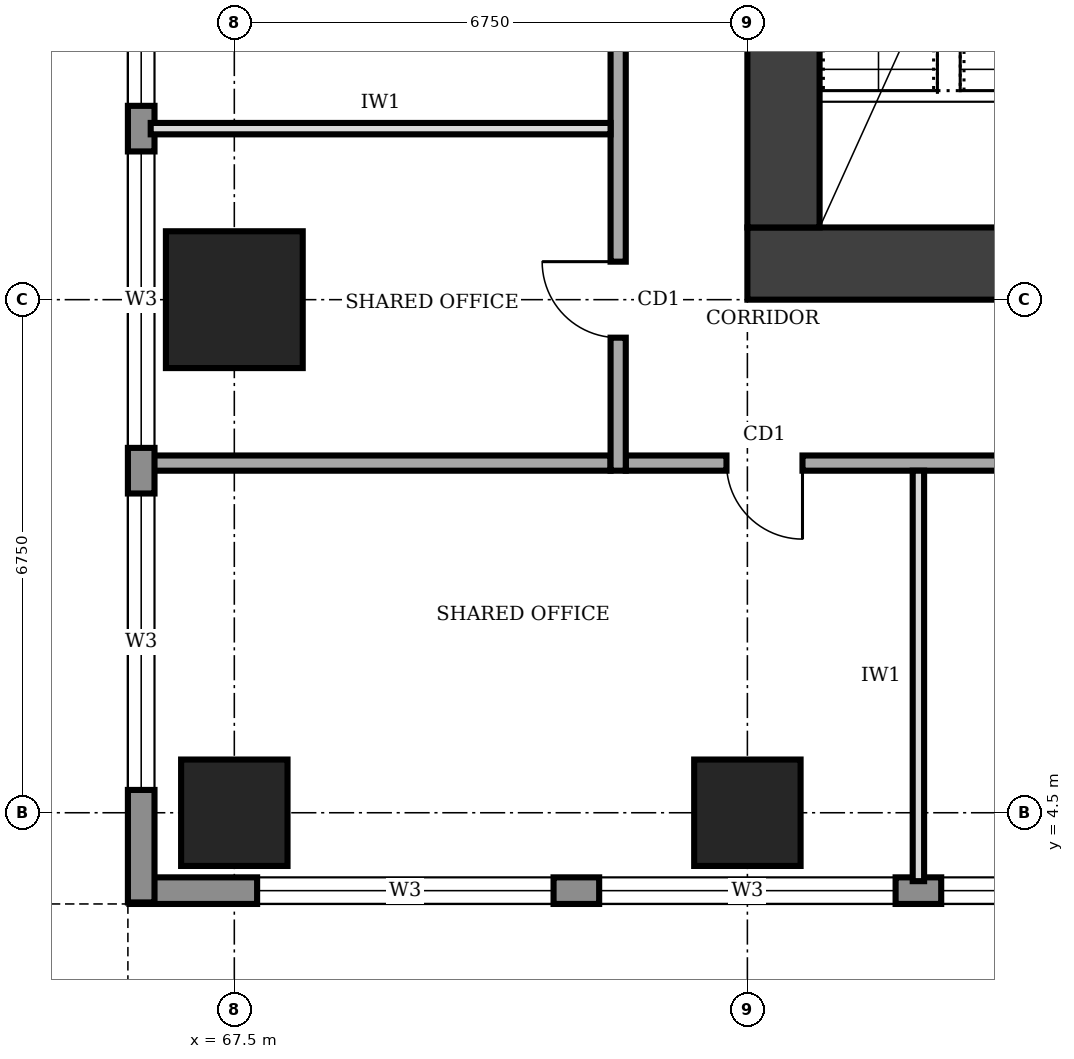
"""IFC4 building model, lengths in metres.
Left out: names, types, materials, properties, quantities, classifications, styles, units other than length and angle.
Written with IfcOpenShell. Run it as: python <this file> out.ifc"""

import sys

from ifc_helpers import new_model, si_unit, direction, frame, frame_2d, origin, origin_2d, place, context, subcontext, project, spatial, rectangle, extrude, element, fill, save


model = new_model("IFC4")
c1 = context("Model", 3, precision=1e-05, world=origin(), true_north=direction((0.0, 1.0)))
c2 = subcontext(c1, "Body", "Model", "MODEL_VIEW")
j1 = project(units=[si_unit("LENGTHUNIT", "METRE"), si_unit("PLANEANGLEUNIT", "RADIAN")], contexts=[c1])
p1 = place(None, origin())
s1 = spatial("IfcSite", under=j1, at=p1, CompositionType="ELEMENT")
p2 = place(p1, origin())
s2 = spatial("IfcBuilding", under=s1, at=p2, CompositionType="ELEMENT")
p3 = place(p2, frame((0.0, 0.0, 181.0)))
s3 = spatial("IfcBuildingStorey", under=s2, at=p3, CompositionType="ELEMENT", Elevation=181.0)
p4 = place(p3, frame((74.25, 11.725, 0.0), z_axis=(0.0, 0.0, 1.0), x_axis=(1.0, 0.0, 0.0)))
e1 = element("IfcWall", 1, at=p4, inside=s3, PredefinedType="SHEAR", context=c2, shape_type="SweptSolid", body=[
    extrude(rectangle(XDim=13.5, YDim=0.95, at=frame_2d((6.75, 0.0))), origin(), (0.0, 0.0, 1.0), 4.0),
])
p5 = place(p4, frame((4.75, 0.0, 0.0)))
e2 = element("IfcOpeningElement", 2, at=p5, cuts=e1, PredefinedType="OPENING", context=c2, shape_type="SweptSolid", body=[
    extrude(rectangle(XDim=1.0, YDim=2.1, at=frame_2d((0.5, 1.05))), frame((0.0, 0.485, 0.0), z_axis=(0.0, -1.0, 0.0), x_axis=(1.0, 0.0, 0.0)), (0.0, 0.0, 1.0), 0.97),
])
p6 = place(p3, frame((74.725, 28.3, 0.0), z_axis=(0.0, 0.0, 1.0), x_axis=(0.0, -1.0, 0.0)))
e3 = element("IfcWall", 3, at=p6, inside=s3, PredefinedType="SHEAR", context=c2, shape_type="SweptSolid", body=[
    extrude(rectangle(XDim=16.1, YDim=0.95, at=frame_2d((8.05, 0.0))), origin(), (0.0, 0.0, 1.0), 4.0),
])
for number, where, z_axis, x_axis in (
    (4, (67.5, 4.5, 0.0), (0.0, 0.0, 1.0), (1.0, 0.0, 0.0)),
    (5, (74.25, 4.5, 0.0), (0.0, 0.0, 1.0), (1.0, 0.0, 0.0)),
):
    element("IfcColumn", number, at=place(p3, frame(where, z_axis=z_axis, x_axis=x_axis)), inside=s3, PredefinedType="COLUMN", context=c2, shape_type="SweptSolid", body=[
        extrude(rectangle(XDim=1.4, YDim=1.4, at=origin_2d()), origin(), (0.0, 0.0, 1.0), 4.0),
    ])
p7 = place(p3, frame((67.5, 11.25, 0.0), z_axis=(0.0, 0.0, 1.0), x_axis=(1.0, 0.0, 0.0)))
e6 = element("IfcColumn", 6, at=p7, inside=s3, PredefinedType="COLUMN", context=c2, shape_type="SweptSolid", body=[
    extrude(rectangle(XDim=1.8, YDim=1.8, at=origin_2d()), origin(), (0.0, 0.0, 1.0), 4.0),
])
p8 = place(p3, frame((66.12, 3.475, 0.0), z_axis=(0.0, 0.0, 1.0), x_axis=(1.0, 0.0, 0.0)))
e7 = element("IfcWall", 7, at=p8, inside=s3, PredefinedType="STANDARD", context=c2, shape_type="SweptSolid", body=[
    extrude(rectangle(XDim=29.91, YDim=0.35, at=frame_2d((14.955, 0.0))), origin(), (0.0, 0.0, 1.0), 3.75),
])
p9 = place(p8, frame((1.68, 0.0, 0.95)))
e8 = element("IfcOpeningElement", 8, at=p9, cuts=e7, PredefinedType="OPENING", context=c2, shape_type="SweptSolid", body=[
    extrude(rectangle(XDim=3.9, YDim=1.8, at=frame_2d((1.95, 0.9))), frame((0.0, 0.185, 0.0), z_axis=(0.0, -1.0, 0.0), x_axis=(1.0, 0.0, 0.0)), (0.0, 0.0, 1.0), 0.37),
])
p10 = place(p8, frame((6.18, 0.0, 0.95)))
e9 = element("IfcOpeningElement", 9, at=p10, cuts=e7, PredefinedType="OPENING", context=c2, shape_type="SweptSolid", body=[
    extrude(rectangle(XDim=3.9, YDim=1.8, at=frame_2d((1.95, 0.9))), frame((0.0, 0.185, 0.0), z_axis=(0.0, -1.0, 0.0), x_axis=(1.0, 0.0, 0.0)), (0.0, 0.0, 1.0), 0.37),
])
p11 = place(p8, frame((10.68, 0.0, 0.95)))
e10 = element("IfcOpeningElement", 10, at=p11, cuts=e7, PredefinedType="OPENING", context=c2, shape_type="SweptSolid", body=[
    extrude(rectangle(XDim=3.9, YDim=1.8, at=frame_2d((1.95, 0.9))), frame((0.0, 0.185, 0.0), z_axis=(0.0, -1.0, 0.0), x_axis=(1.0, 0.0, 0.0)), (0.0, 0.0, 1.0), 0.37),
])
p12 = place(p8, frame((15.18, 0.0, 0.95)))
e11 = element("IfcOpeningElement", 11, at=p12, cuts=e7, PredefinedType="OPENING", context=c2, shape_type="SweptSolid", body=[
    extrude(rectangle(XDim=3.9, YDim=1.8, at=frame_2d((1.95, 0.9))), frame((0.0, 0.185, 0.0), z_axis=(0.0, -1.0, 0.0), x_axis=(1.0, 0.0, 0.0)), (0.0, 0.0, 1.0), 0.37),
])
p13 = place(p8, frame((19.68, 0.0, 0.95)))
e12 = element("IfcOpeningElement", 12, at=p13, cuts=e7, PredefinedType="OPENING", context=c2, shape_type="SweptSolid", body=[
    extrude(rectangle(XDim=3.9, YDim=1.8, at=frame_2d((1.95, 0.9))), frame((0.0, 0.185, 0.0), z_axis=(0.0, -1.0, 0.0), x_axis=(1.0, 0.0, 0.0)), (0.0, 0.0, 1.0), 0.37),
])
p14 = place(p8, frame((24.18, 0.0, 0.95)))
e13 = element("IfcOpeningElement", 13, at=p14, cuts=e7, PredefinedType="OPENING", context=c2, shape_type="SweptSolid", body=[
    extrude(rectangle(XDim=3.9, YDim=1.8, at=frame_2d((1.95, 0.9))), frame((0.0, 0.185, 0.0), z_axis=(0.0, -1.0, 0.0), x_axis=(1.0, 0.0, 0.0)), (0.0, 0.0, 1.0), 0.37),
])
p15 = place(p3, frame((66.275, 37.18, 0.0), z_axis=(0.0, 0.0, 1.0), x_axis=(0.0, -1.0, 0.0)))
e14 = element("IfcWall", 14, at=p15, inside=s3, PredefinedType="STANDARD", context=c2, shape_type="SweptSolid", body=[
    extrude(rectangle(XDim=33.86, YDim=0.35, at=frame_2d((16.93, 0.0))), origin(), (0.0, 0.0, 1.0), 3.75),
])
p16 = place(p15, frame((28.48, 0.0, 0.95)))
e15 = element("IfcOpeningElement", 15, at=p16, cuts=e14, PredefinedType="OPENING", context=c2, shape_type="SweptSolid", body=[
    extrude(rectangle(XDim=3.9, YDim=1.8, at=frame_2d((1.95, 0.9))), frame((0.0, 0.185, 0.0), z_axis=(0.0, -1.0, 0.0), x_axis=(1.0, 0.0, 0.0)), (0.0, 0.0, 1.0), 0.37),
])
p17 = place(p15, frame((23.98, 0.0, 0.95)))
e16 = element("IfcOpeningElement", 16, at=p17, cuts=e14, PredefinedType="OPENING", context=c2, shape_type="SweptSolid", body=[
    extrude(rectangle(XDim=3.9, YDim=1.8, at=frame_2d((1.95, 0.9))), frame((0.0, 0.185, 0.0), z_axis=(0.0, -1.0, 0.0), x_axis=(1.0, 0.0, 0.0)), (0.0, 0.0, 1.0), 0.37),
])
p18 = place(p15, frame((19.48, 0.0, 0.95)))
e17 = element("IfcOpeningElement", 17, at=p18, cuts=e14, PredefinedType="OPENING", context=c2, shape_type="SweptSolid", body=[
    extrude(rectangle(XDim=3.9, YDim=1.8, at=frame_2d((1.95, 0.9))), frame((0.0, 0.185, 0.0), z_axis=(0.0, -1.0, 0.0), x_axis=(1.0, 0.0, 0.0)), (0.0, 0.0, 1.0), 0.37),
])
p19 = place(p15, frame((14.98, 0.0, 0.95)))
e18 = element("IfcOpeningElement", 18, at=p19, cuts=e14, PredefinedType="OPENING", context=c2, shape_type="SweptSolid", body=[
    extrude(rectangle(XDim=3.9, YDim=1.8, at=frame_2d((1.95, 0.9))), frame((0.0, 0.185, 0.0), z_axis=(0.0, -1.0, 0.0), x_axis=(1.0, 0.0, 0.0)), (0.0, 0.0, 1.0), 0.37),
])
p20 = place(p15, frame((10.48, 0.0, 0.95)))
e19 = element("IfcOpeningElement", 19, at=p20, cuts=e14, PredefinedType="OPENING", context=c2, shape_type="SweptSolid", body=[
    extrude(rectangle(XDim=3.9, YDim=1.8, at=frame_2d((1.95, 0.9))), frame((0.0, 0.185, 0.0), z_axis=(0.0, -1.0, 0.0), x_axis=(1.0, 0.0, 0.0)), (0.0, 0.0, 1.0), 0.37),
])
p21 = place(p15, frame((5.98, 0.0, 0.95)))
e20 = element("IfcOpeningElement", 20, at=p21, cuts=e14, PredefinedType="OPENING", context=c2, shape_type="SweptSolid", body=[
    extrude(rectangle(XDim=3.9, YDim=1.8, at=frame_2d((1.95, 0.9))), frame((0.0, 0.185, 0.0), z_axis=(0.0, -1.0, 0.0), x_axis=(1.0, 0.0, 0.0)), (0.0, 0.0, 1.0), 0.37),
])
p22 = place(p15, frame((1.48, 0.0, 0.95)))
e21 = element("IfcOpeningElement", 21, at=p22, cuts=e14, PredefinedType="OPENING", context=c2, shape_type="SweptSolid", body=[
    extrude(rectangle(XDim=3.9, YDim=1.8, at=frame_2d((1.95, 0.9))), frame((0.0, 0.185, 0.0), z_axis=(0.0, -1.0, 0.0), x_axis=(1.0, 0.0, 0.0)), (0.0, 0.0, 1.0), 0.37),
])
p23 = place(p3, frame((72.65, 9.1, 0.0), z_axis=(0.0, 0.0, 1.0), x_axis=(1.0, 0.0, 0.0)))
e22 = element("IfcWall", 22, at=p23, inside=s3, PredefinedType="SOLIDWALL", context=c2, shape_type="SweptSolid", body=[
    extrude(rectangle(XDim=16.9, YDim=0.2, at=frame_2d((8.45, 0.0))), origin(), (0.0, 0.0, 1.0), 3.75),
])
p24 = place(p23, frame((1.325, 0.0, 0.0)))
e23 = element("IfcOpeningElement", 23, at=p24, cuts=e22, PredefinedType="OPENING", context=c2, shape_type="SweptSolid", body=[
    extrude(rectangle(XDim=1.0, YDim=2.1, at=frame_2d((0.5, 1.05))), frame((0.0, 0.11, 0.0), z_axis=(0.0, -1.0, 0.0), x_axis=(1.0, 0.0, 0.0)), (0.0, 0.0, 1.0), 0.22),
])
p25 = place(p23, frame((9.475, 0.0, 0.0)))
e24 = element("IfcOpeningElement", 24, at=p25, cuts=e22, PredefinedType="OPENING", context=c2, shape_type="SweptSolid", body=[
    extrude(rectangle(XDim=1.8, YDim=2.1, at=frame_2d((0.9, 1.05))), frame((0.0, 0.11, 0.0), z_axis=(0.0, -1.0, 0.0), x_axis=(1.0, 0.0, 0.0)), (0.0, 0.0, 1.0), 0.22),
])
p26 = place(p3, frame((72.55, 32.05, 0.0), z_axis=(0.0, 0.0, 1.0), x_axis=(0.0, -1.0, 0.0)))
e25 = element("IfcWall", 25, at=p26, inside=s3, PredefinedType="SOLIDWALL", context=c2, shape_type="SweptSolid", body=[
    extrude(rectangle(XDim=23.05, YDim=0.2, at=frame_2d((11.525, 0.0))), origin(), (0.0, 0.0, 1.0), 3.75),
])
p27 = place(p26, frame((20.3, 0.0, 0.0)))
e26 = element("IfcOpeningElement", 26, at=p27, cuts=e25, PredefinedType="OPENING", context=c2, shape_type="SweptSolid", body=[
    extrude(rectangle(XDim=1.0, YDim=2.1, at=frame_2d((0.5, 1.05))), frame((0.0, 0.11, 0.0), z_axis=(0.0, -1.0, 0.0), x_axis=(1.0, 0.0, 0.0)), (0.0, 0.0, 1.0), 0.22),
])
p28 = place(p26, frame((15.875, 0.0, 0.0)))
e27 = element("IfcOpeningElement", 27, at=p28, cuts=e25, PredefinedType="OPENING", context=c2, shape_type="SweptSolid", body=[
    extrude(rectangle(XDim=1.0, YDim=2.1, at=frame_2d((0.5, 1.05))), frame((0.0, 0.11, 0.0), z_axis=(0.0, -1.0, 0.0), x_axis=(1.0, 0.0, 0.0)), (0.0, 0.0, 1.0), 0.22),
])
p29 = place(p26, frame((11.3, 0.0, 0.0)))
e28 = element("IfcOpeningElement", 28, at=p29, cuts=e25, PredefinedType="OPENING", context=c2, shape_type="SweptSolid", body=[
    extrude(rectangle(XDim=1.0, YDim=2.1, at=frame_2d((0.5, 1.05))), frame((0.0, 0.11, 0.0), z_axis=(0.0, -1.0, 0.0), x_axis=(1.0, 0.0, 0.0)), (0.0, 0.0, 1.0), 0.22),
])
p30 = place(p26, frame((6.725, 0.0, 0.0)))
e29 = element("IfcOpeningElement", 29, at=p30, cuts=e25, PredefinedType="OPENING", context=c2, shape_type="SweptSolid", body=[
    extrude(rectangle(XDim=1.0, YDim=2.1, at=frame_2d((0.5, 1.05))), frame((0.0, 0.11, 0.0), z_axis=(0.0, -1.0, 0.0), x_axis=(1.0, 0.0, 0.0)), (0.0, 0.0, 1.0), 0.22),
])
p31 = place(p26, frame((1.925, 0.0, 0.0)))
e30 = element("IfcOpeningElement", 30, at=p31, cuts=e25, PredefinedType="OPENING", context=c2, shape_type="SweptSolid", body=[
    extrude(rectangle(XDim=1.0, YDim=2.1, at=frame_2d((0.5, 1.05))), frame((0.0, 0.11, 0.0), z_axis=(0.0, -1.0, 0.0), x_axis=(1.0, 0.0, 0.0)), (0.0, 0.0, 1.0), 0.22),
])
p32 = place(p3, frame((66.4, 9.1, 0.0), z_axis=(0.0, 0.0, 1.0), x_axis=(1.0, 0.0, 0.0)))
e31 = element("IfcWall", 31, at=p32, inside=s3, PredefinedType="SOLIDWALL", context=c2, shape_type="SweptSolid", body=[
    extrude(rectangle(XDim=6.05, YDim=0.2, at=frame_2d((3.025, 0.0))), origin(), (0.0, 0.0, 1.0), 3.75),
])
p33 = place(p3, frame((76.5, 3.6, 0.0), z_axis=(0.0, 0.0, 1.0), x_axis=(0.0, 1.0, 0.0)))
e32 = element("IfcWall", 32, at=p33, inside=s3, PredefinedType="PARTITIONING", context=c2, shape_type="SweptSolid", body=[
    extrude(rectangle(XDim=5.4, YDim=0.15, at=frame_2d((2.7, 0.0))), origin(), (0.0, 0.0, 1.0), 3.75),
])
p34 = place(p3, frame((66.4, 13.5, 0.0), z_axis=(0.0, 0.0, 1.0), x_axis=(1.0, 0.0, 0.0)))
e33 = element("IfcWall", 33, at=p34, inside=s3, PredefinedType="PARTITIONING", context=c2, shape_type="SweptSolid", body=[
    extrude(rectangle(XDim=6.05, YDim=0.15, at=frame_2d((3.025, 0.0))), origin(), (0.0, 0.0, 1.0), 3.75),
])
p35 = place(p9, origin())
e34 = element("IfcWindow", 34, at=p35, inside=s3, PartitioningType="SINGLE_PANEL", PredefinedType="WINDOW", context=c2, shape_type="SweptSolid", body=[
    extrude(rectangle(XDim=3.9, YDim=1.8, at=frame_2d((1.95, 0.9))), frame((0.0, 0.03, 0.0), z_axis=(0.0, -1.0, 0.0), x_axis=(1.0, 0.0, 0.0)), (0.0, 0.0, 1.0), 0.06),
])
fill(e8, e34)
p36 = place(p10, origin())
e35 = element("IfcWindow", 35, at=p36, inside=s3, PartitioningType="SINGLE_PANEL", PredefinedType="WINDOW", context=c2, shape_type="SweptSolid", body=[
    extrude(rectangle(XDim=3.9, YDim=1.8, at=frame_2d((1.95, 0.9))), frame((0.0, 0.03, 0.0), z_axis=(0.0, -1.0, 0.0), x_axis=(1.0, 0.0, 0.0)), (0.0, 0.0, 1.0), 0.06),
])
fill(e9, e35)
p37 = place(p11, origin())
e36 = element("IfcWindow", 36, at=p37, inside=s3, PartitioningType="SINGLE_PANEL", PredefinedType="WINDOW", context=c2, shape_type="SweptSolid", body=[
    extrude(rectangle(XDim=3.9, YDim=1.8, at=frame_2d((1.95, 0.9))), frame((0.0, 0.03, 0.0), z_axis=(0.0, -1.0, 0.0), x_axis=(1.0, 0.0, 0.0)), (0.0, 0.0, 1.0), 0.06),
])
fill(e10, e36)
p38 = place(p16, origin())
e37 = element("IfcWindow", 37, at=p38, inside=s3, PartitioningType="SINGLE_PANEL", PredefinedType="WINDOW", context=c2, shape_type="SweptSolid", body=[
    extrude(rectangle(XDim=3.9, YDim=1.8, at=frame_2d((1.95, 0.9))), frame((0.0, 0.03, 0.0), z_axis=(0.0, -1.0, 0.0), x_axis=(1.0, 0.0, 0.0)), (0.0, 0.0, 1.0), 0.06),
])
fill(e15, e37)
p39 = place(p17, origin())
e38 = element("IfcWindow", 38, at=p39, inside=s3, PartitioningType="SINGLE_PANEL", PredefinedType="WINDOW", context=c2, shape_type="SweptSolid", body=[
    extrude(rectangle(XDim=3.9, YDim=1.8, at=frame_2d((1.95, 0.9))), frame((0.0, 0.03, 0.0), z_axis=(0.0, -1.0, 0.0), x_axis=(1.0, 0.0, 0.0)), (0.0, 0.0, 1.0), 0.06),
])
fill(e16, e38)
p40 = place(p18, origin())
e39 = element("IfcWindow", 39, at=p40, inside=s3, PartitioningType="SINGLE_PANEL", PredefinedType="WINDOW", context=c2, shape_type="SweptSolid", body=[
    extrude(rectangle(XDim=3.9, YDim=1.8, at=frame_2d((1.95, 0.9))), frame((0.0, 0.03, 0.0), z_axis=(0.0, -1.0, 0.0), x_axis=(1.0, 0.0, 0.0)), (0.0, 0.0, 1.0), 0.06),
])
fill(e17, e39)
p41 = place(p24, frame((1.0, 0.0, 0.0), z_axis=(0.0, 0.0, 1.0), x_axis=(-1.0, 0.0, 0.0)))
e40 = element("IfcDoor", 40, at=p41, inside=s3, OperationType="SINGLE_SWING_LEFT", PredefinedType="DOOR", context=c2, shape_type="SweptSolid", body=[
    extrude(rectangle(XDim=1.0, YDim=2.1, at=frame_2d((0.5, 1.05))), frame((0.0, 0.025, 0.0), z_axis=(0.0, -1.0, 0.0), x_axis=(1.0, 0.0, 0.0)), (0.0, 0.0, 1.0), 0.05),
])
fill(e23, e40)
p42 = place(p27, frame((1.0, 0.0, 0.0), z_axis=(0.0, 0.0, 1.0), x_axis=(-1.0, 0.0, 0.0)))
e41 = element("IfcDoor", 41, at=p42, inside=s3, OperationType="SINGLE_SWING_RIGHT", PredefinedType="DOOR", context=c2, shape_type="SweptSolid", body=[
    extrude(rectangle(XDim=1.0, YDim=2.1, at=frame_2d((0.5, 1.05))), frame((0.0, 0.025, 0.0), z_axis=(0.0, -1.0, 0.0), x_axis=(1.0, 0.0, 0.0)), (0.0, 0.0, 1.0), 0.05),
])
fill(e26, e41)
save(model, sys.argv[1])
